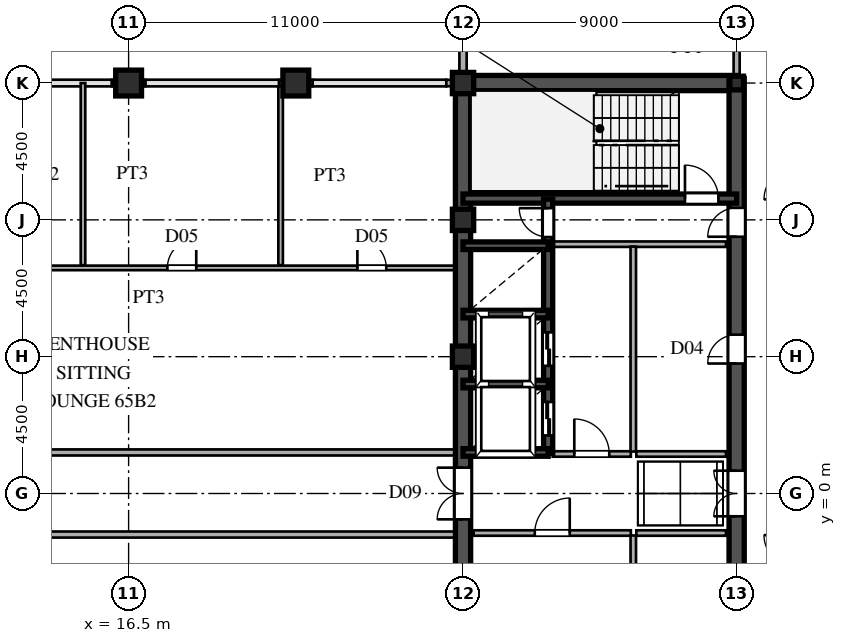
"""IFC4 building model, lengths in metres.
Left out: names, types, materials, properties, quantities, classifications, styles, units other than length and angle.
Written with IfcOpenShell. Run it as: python <this file> out.ifc"""

import sys

from ifc_helpers import new_model, si_unit, direction, frame, frame_2d, origin, origin_2d, place, context, subcontext, project, spatial, rectangle, hollow_rectangle, i_section, extrude, source, transform, mapped, element, fill, save


model = new_model("IFC4")
c1 = context("Model", 3, precision=1e-05, world=origin(), true_north=direction((0.0, 1.0)))
c2 = subcontext(c1, "Body", "Model", "MODEL_VIEW")
j1 = project(units=[si_unit("LENGTHUNIT", "METRE"), si_unit("PLANEANGLEUNIT", "RADIAN")], contexts=[c1])
p1 = place(None, origin())
s1 = spatial("IfcSite", under=j1, at=p1, CompositionType="ELEMENT")
p2 = place(p1, origin())
s2 = spatial("IfcBuilding", under=s1, at=p2, CompositionType="ELEMENT")
p3 = place(p2, frame((0.0, 0.0, 246.9)))
s3 = spatial("IfcBuildingStorey", under=s2, at=p3, CompositionType="ELEMENT", Elevation=246.9)
m1 = source(origin(), c2, "Body", "SweptSolid", [
    extrude(hollow_rectangle(XDim=0.7, YDim=0.7, WallThickness=0.03, at=origin_2d()), origin(), (0.0, 0.0, 1.0), 3.75),
])
for number, where, z_axis, x_axis in (
    (1, (27.5, 4.5, 0.0), (0.0, 0.0, 1.0), (1.0, 0.0, 0.0)),
    (2, (27.5, 9.0, 0.0), (0.0, 0.0, 1.0), (1.0, 0.0, 0.0)),
    (3, (27.5, 13.5, 0.0), (0.0, 0.0, 1.0), (1.0, 0.0, 0.0)),
):
    element("IfcColumn", number, at=place(p3, frame(where, z_axis=z_axis, x_axis=x_axis)), inside=s3, PredefinedType="COLUMN", context=c2, shape_type="MappedRepresentation", body=[
        mapped(m1, transform((0.0, 0.0, 0.0), scale=1.0)),
    ])
m2 = source(origin(), c2, "Body", "SweptSolid", [
    extrude(i_section(OverallWidth=0.45, OverallDepth=0.45, WebThickness=0.016, FlangeThickness=0.025, at=origin_2d()), origin(), (0.0, 0.0, 1.0), 3.75),
])
p4 = place(p3, frame((36.5, 13.5, 0.0), z_axis=(0.0, 0.0, 1.0), x_axis=(1.0, 0.0, 0.0)))
e4 = element("IfcColumn", 4, at=p4, inside=s3, PredefinedType="COLUMN", context=c2, shape_type="MappedRepresentation", body=[
    mapped(m2, transform((0.0, 0.0, 0.0), scale=1.0)),
])
m3 = source(origin(), c2, "Body", "SweptSolid", [
    extrude(hollow_rectangle(XDim=0.85, YDim=0.85, WallThickness=0.036, at=origin_2d()), origin(), (0.0, 0.0, 1.0), 3.75),
])
for number, where, z_axis, x_axis in (
    (5, (16.5, 13.5, 0.0), (0.0, 0.0, 1.0), (1.0, 0.0, 0.0)),
    (6, (22.0, 13.5, 0.0), (0.0, 0.0, 1.0), (1.0, 0.0, 0.0)),
):
    element("IfcColumn", number, at=place(p3, frame(where, z_axis=z_axis, x_axis=x_axis)), inside=s3, PredefinedType="COLUMN", context=c2, shape_type="MappedRepresentation", body=[
        mapped(m3, transform((0.0, 0.0, 0.0), scale=1.0)),
    ])
p5 = place(p3, frame((27.5, 13.755, 0.0), z_axis=(0.0, 0.0, 1.0), x_axis=(0.0, 1.0, 0.0)))
e7 = element("IfcWall", 7, at=p5, inside=s3, PredefinedType="SOLIDWALL", context=c2, shape_type="SweptSolid", body=[
    extrude(rectangle(XDim=0.62, YDim=0.24, at=frame_2d((0.31, 0.0))), origin(), (0.0, 0.0, 1.0), 3.03),
])
p6 = place(p3, frame((27.5, 14.375, 0.0), z_axis=(0.0, 0.0, 1.0), x_axis=(0.0, 1.0, 0.0)))
e8 = element("IfcWall", 8, at=p6, inside=s3, PredefinedType="SOLIDWALL", context=c2, shape_type="SweptSolid", body=[
    extrude(rectangle(XDim=1.605, YDim=0.24, at=frame_2d((0.803, 0.0))), origin(), (0.0, 0.0, 1.0), 3.53),
])
for number, where, z_axis, x_axis in (
    (9, (15.95, 13.5, 0.0), (0.0, 0.0, 1.0), (1.0, 0.0, 0.0)),
    (10, (21.45, 13.5, 0.0), (0.0, 0.0, 1.0), (1.0, 0.0, 0.0)),
):
    element("IfcWall", number, at=place(p3, frame(where, z_axis=z_axis, x_axis=x_axis)), inside=s3, PredefinedType="SOLIDWALL", context=c2, shape_type="SweptSolid", body=[
        extrude(rectangle(XDim=1.1, YDim=0.21, at=frame_2d((0.55, 0.0))), origin(), (0.0, 0.0, 1.0), 3.03),
    ])
p7 = place(p3, frame((26.95, 13.5, 0.0), z_axis=(0.0, 0.0, 1.0), x_axis=(1.0, 0.0, 0.0)))
e11 = element("IfcWall", 11, at=p7, inside=s3, PredefinedType="SOLIDWALL", context=c2, shape_type="SweptSolid", body=[
    extrude(rectangle(XDim=0.54, YDim=0.21, at=frame_2d((0.27, 0.0))), origin(), (0.0, 0.0, 1.0), 3.03),
])
for number, where, z_axis, x_axis in (
    (12, (27.5, -13.5, 0.0), (0.0, 0.0, 1.0), (0.0, 1.0, 0.0)),
    (13, (27.5, 1.3, 0.0), (0.0, 0.0, 1.0), (0.0, 1.0, 0.0)),
):
    element("IfcWall", number, at=place(p3, frame(where, z_axis=z_axis, x_axis=x_axis)), inside=s3, PredefinedType="SHEAR", context=c2, shape_type="SweptSolid", body=[
        extrude(rectangle(XDim=12.2, YDim=0.5, at=frame_2d((6.1, 0.0))), origin(), (0.0, 0.0, 1.0), 3.53),
    ])
p8 = place(p3, frame((27.5, -1.3, 0.0), z_axis=(0.0, 0.0, 1.0), x_axis=(0.0, 1.0, 0.0)))
e14 = element("IfcWall", 14, at=p8, inside=s3, PredefinedType="SHEAR", context=c2, shape_type="SweptSolid", body=[
    extrude(rectangle(XDim=2.6, YDim=0.5, at=frame_2d((1.3, 0.0))), origin(), (0.0, 0.0, 1.0), 3.53),
])
p9 = place(p8, frame((0.45, 0.0, 0.0)))
e15 = element("IfcOpeningElement", 15, at=p9, cuts=e14, PredefinedType="OPENING", context=c2, shape_type="SweptSolid", body=[
    extrude(rectangle(XDim=1.7, YDim=2.35, at=frame_2d((0.85, 1.175))), frame((0.0, 0.26, 0.0), z_axis=(0.0, -1.0, 0.0), x_axis=(1.0, 0.0, 0.0)), (0.0, 0.0, 1.0), 0.52),
])
p10 = place(p3, frame((27.5, 13.5, 0.0), z_axis=(0.0, 0.0, 1.0), x_axis=(1.0, 0.0, 0.0)))
e16 = element("IfcWall", 16, at=p10, inside=s3, PredefinedType="SHEAR", context=c2, shape_type="SweptSolid", body=[
    extrude(rectangle(XDim=9.0, YDim=0.5, at=frame_2d((4.5, 0.0))), origin(), (0.0, 0.0, 1.0), 3.53),
])
p11 = place(p3, frame((36.5, -1.3, 0.0), z_axis=(0.0, 0.0, 1.0), x_axis=(0.0, 1.0, 0.0)))
e17 = element("IfcWall", 17, at=p11, inside=s3, PredefinedType="SHEAR", context=c2, shape_type="SweptSolid", body=[
    extrude(rectangle(XDim=2.6, YDim=0.5, at=frame_2d((1.3, 0.0))), origin(), (0.0, 0.0, 1.0), 3.53),
])
p12 = place(p11, frame((0.55, 0.0, 0.0)))
e18 = element("IfcOpeningElement", 18, at=p12, cuts=e17, PredefinedType="OPENING", context=c2, shape_type="SweptSolid", body=[
    extrude(rectangle(XDim=1.5, YDim=2.3, at=frame_2d((0.75, 1.15))), frame((0.0, 0.26, 0.0), z_axis=(0.0, -1.0, 0.0), x_axis=(1.0, 0.0, 0.0)), (0.0, 0.0, 1.0), 0.52),
])
p13 = place(p3, frame((36.5, 8.2, 0.0), z_axis=(0.0, 0.0, 1.0), x_axis=(0.0, 1.0, 0.0)))
e19 = element("IfcWall", 19, at=p13, inside=s3, PredefinedType="SHEAR", context=c2, shape_type="SweptSolid", body=[
    extrude(rectangle(XDim=5.45, YDim=0.5, at=frame_2d((2.725, 0.0))), origin(), (0.0, 0.0, 1.0), 3.53),
])
p14 = place(p13, frame((0.245, 0.0, 0.0)))
e20 = element("IfcOpeningElement", 20, at=p14, cuts=e19, PredefinedType="OPENING", context=c2, shape_type="SweptSolid", body=[
    extrude(rectangle(XDim=0.95, YDim=2.15, at=frame_2d((0.475, 1.075))), frame((0.0, 0.26, 0.0), z_axis=(0.0, -1.0, 0.0), x_axis=(1.0, 0.0, 0.0)), (0.0, 0.0, 1.0), 0.52),
])
p15 = place(p3, frame((36.5, -6.5, 0.0), z_axis=(0.0, 0.0, 1.0), x_axis=(0.0, 1.0, 0.0)))
e21 = element("IfcWall", 21, at=p15, inside=s3, PredefinedType="SHEAR", context=c2, shape_type="SweptSolid", body=[
    extrude(rectangle(XDim=5.2, YDim=0.5, at=frame_2d((2.6, 0.0))), origin(), (0.0, 0.0, 1.0), 3.53),
])
p16 = place(p15, frame((2.125, 0.0, 0.0)))
e22 = element("IfcOpeningElement", 22, at=p16, cuts=e21, PredefinedType="OPENING", context=c2, shape_type="SweptSolid", body=[
    extrude(rectangle(XDim=0.95, YDim=2.15, at=frame_2d((0.475, 1.075))), frame((0.0, 0.26, 0.0), z_axis=(0.0, -1.0, 0.0), x_axis=(1.0, 0.0, 0.0)), (0.0, 0.0, 1.0), 0.52),
])
p17 = place(p3, frame((36.5, 1.3, 0.0), z_axis=(0.0, 0.0, 1.0), x_axis=(0.0, 1.0, 0.0)))
e23 = element("IfcWall", 23, at=p17, inside=s3, PredefinedType="SHEAR", context=c2, shape_type="SweptSolid", body=[
    extrude(rectangle(XDim=6.9, YDim=0.5, at=frame_2d((3.45, 0.0))), origin(), (0.0, 0.0, 1.0), 3.53),
])
p18 = place(p17, frame((2.975, 0.0, 0.0)))
e24 = element("IfcOpeningElement", 24, at=p18, cuts=e23, PredefinedType="OPENING", context=c2, shape_type="SweptSolid", body=[
    extrude(rectangle(XDim=0.95, YDim=2.15, at=frame_2d((0.475, 1.075))), frame((0.0, 0.26, 0.0), z_axis=(0.0, -1.0, 0.0), x_axis=(1.0, 0.0, 0.0)), (0.0, 0.0, 1.0), 0.52),
])
p19 = place(p3, frame((27.5, 9.7, 0.0), z_axis=(0.0, 0.0, 1.0), x_axis=(1.0, 0.0, 0.0)))
e25 = element("IfcWall", 25, at=p19, inside=s3, PredefinedType="SHEAR", context=c2, shape_type="SweptSolid", body=[
    extrude(rectangle(XDim=9.0, YDim=0.3, at=frame_2d((4.5, 0.0))), origin(), (0.0, 0.0, 1.0), 3.53),
])
p20 = place(p19, frame((7.3, 0.0, 0.0)))
e26 = element("IfcOpeningElement", 26, at=p20, cuts=e25, PredefinedType="OPENING", context=c2, shape_type="SweptSolid", body=[
    extrude(rectangle(XDim=1.1, YDim=2.2, at=frame_2d((0.55, 1.1))), frame((0.0, 0.16, 0.0), z_axis=(0.0, -1.0, 0.0), x_axis=(1.0, 0.0, 0.0)), (0.0, 0.0, 1.0), 0.32),
])
for number, where, z_axis, x_axis in (
    (27, (27.5, 1.35, 0.0), (0.0, 0.0, 1.0), (1.0, 0.0, 0.0)),
    (28, (27.5, 3.6, 0.0), (0.0, 0.0, 1.0), (1.0, 0.0, 0.0)),
    (29, (27.5, 5.9, 0.0), (0.0, 0.0, 1.0), (1.0, 0.0, 0.0)),
    (30, (27.5, 8.15, 0.0), (0.0, 0.0, 1.0), (1.0, 0.0, 0.0)),
):
    element("IfcWall", number, at=place(p3, frame(where, z_axis=z_axis, x_axis=x_axis)), inside=s3, PredefinedType="SHEAR", context=c2, shape_type="SweptSolid", body=[
        extrude(rectangle(XDim=2.8, YDim=0.25, at=frame_2d((1.4, 0.0))), origin(), (0.0, 0.0, 1.0), 3.53),
    ])
p21 = place(p3, frame((30.3, 1.32, 0.0), z_axis=(0.0, 0.0, 1.0), x_axis=(0.0, 1.0, 0.0)))
e31 = element("IfcWall", 31, at=p21, inside=s3, PredefinedType="SHEAR", context=c2, shape_type="SweptSolid", body=[
    extrude(rectangle(XDim=2.28, YDim=0.3, at=frame_2d((1.14, 0.0))), origin(), (0.0, 0.0, 1.0), 3.53),
])
p22 = place(p21, frame((0.59, 0.0, 0.0)))
e32 = element("IfcOpeningElement", 32, at=p22, cuts=e31, PredefinedType="OPENING", context=c2, shape_type="SweptSolid", body=[
    extrude(rectangle(XDim=1.1, YDim=2.2, at=frame_2d((0.55, 1.1))), frame((0.0, 0.16, 0.0), z_axis=(0.0, -1.0, 0.0), x_axis=(1.0, 0.0, 0.0)), (0.0, 0.0, 1.0), 0.32),
])
p23 = place(p3, frame((30.3, 3.6, 0.0), z_axis=(0.0, 0.0, 1.0), x_axis=(0.0, 1.0, 0.0)))
e33 = element("IfcWall", 33, at=p23, inside=s3, PredefinedType="SHEAR", context=c2, shape_type="SweptSolid", body=[
    extrude(rectangle(XDim=2.3, YDim=0.3, at=frame_2d((1.15, 0.0))), origin(), (0.0, 0.0, 1.0), 3.53),
])
p24 = place(p23, frame((0.6, 0.0, 0.0)))
e34 = element("IfcOpeningElement", 34, at=p24, cuts=e33, PredefinedType="OPENING", context=c2, shape_type="SweptSolid", body=[
    extrude(rectangle(XDim=1.1, YDim=2.2, at=frame_2d((0.55, 1.1))), frame((0.0, 0.16, 0.0), z_axis=(0.0, -1.0, 0.0), x_axis=(1.0, 0.0, 0.0)), (0.0, 0.0, 1.0), 0.32),
])
p25 = place(p3, frame((30.3, 5.9, 0.0), z_axis=(0.0, 0.0, 1.0), x_axis=(0.0, 1.0, 0.0)))
e35 = element("IfcWall", 35, at=p25, inside=s3, PredefinedType="SHEAR", context=c2, shape_type="SweptSolid", body=[
    extrude(rectangle(XDim=2.25, YDim=0.3, at=frame_2d((1.125, 0.0))), origin(), (0.0, 0.0, 1.0), 3.53),
])
p26 = place(p3, frame((30.3, 8.15, 0.0), z_axis=(0.0, 0.0, 1.0), x_axis=(0.0, 1.0, 0.0)))
e36 = element("IfcWall", 36, at=p26, inside=s3, PredefinedType="SHEAR", context=c2, shape_type="SweptSolid", body=[
    extrude(rectangle(XDim=1.53, YDim=0.3, at=frame_2d((0.765, 0.0))), origin(), (0.0, 0.0, 1.0), 3.53),
])
p27 = place(p26, frame((0.285, 0.0, 0.0)))
e37 = element("IfcOpeningElement", 37, at=p27, cuts=e36, PredefinedType="OPENING", context=c2, shape_type="SweptSolid", body=[
    extrude(rectangle(XDim=0.95, YDim=2.15, at=frame_2d((0.475, 1.075))), frame((0.0, 0.16, 0.0), z_axis=(0.0, -1.0, 0.0), x_axis=(1.0, 0.0, 0.0)), (0.0, 0.0, 1.0), 0.32),
])
p28 = place(p3, frame((30.45, 8.2, 0.0), z_axis=(0.0, 0.0, 1.0), x_axis=(1.0, 0.0, 0.0)))
e38 = element("IfcWall", 38, at=p28, inside=s3, PredefinedType="PARTITIONING", context=c2, shape_type="SweptSolid", body=[
    extrude(rectangle(XDim=5.7, YDim=0.18, at=frame_2d((2.85, 0.0))), origin(), (0.0, 0.0, 1.0), 3.53),
])
p29 = place(p3, frame((33.1, -6.42, 0.0), z_axis=(0.0, 0.0, 1.0), x_axis=(0.0, 1.0, 0.0)))
e39 = element("IfcWall", 39, at=p29, inside=s3, PredefinedType="PARTITIONING", context=c2, shape_type="SweptSolid", body=[
    extrude(rectangle(XDim=5.04, YDim=0.18, at=frame_2d((2.52, 0.0))), origin(), (0.0, 0.0, 1.0), 3.53),
])
p30 = place(p3, frame((33.1, 1.38, 0.0), z_axis=(0.0, 0.0, 1.0), x_axis=(0.0, 1.0, 0.0)))
e40 = element("IfcWall", 40, at=p30, inside=s3, PredefinedType="PARTITIONING", context=c2, shape_type="SweptSolid", body=[
    extrude(rectangle(XDim=6.74, YDim=0.18, at=frame_2d((3.37, 0.0))), origin(), (0.0, 0.0, 1.0), 3.53),
])
p31 = place(p3, frame((27.85, -1.3, 0.0), z_axis=(0.0, 0.0, 1.0), x_axis=(1.0, 0.0, 0.0)))
e41 = element("IfcWall", 41, at=p31, inside=s3, PredefinedType="PARTITIONING", context=c2, shape_type="SweptSolid", body=[
    extrude(rectangle(XDim=5.17, YDim=0.18, at=frame_2d((2.585, 0.0))), origin(), (0.0, 0.0, 1.0), 3.53),
])
p32 = place(p31, frame((2.01, 0.0, 0.0)))
e42 = element("IfcOpeningElement", 42, at=p32, cuts=e41, PredefinedType="OPENING", context=c2, shape_type="SweptSolid", body=[
    extrude(rectangle(XDim=1.15, YDim=2.2, at=frame_2d((0.575, 1.1))), frame((0.0, 0.1, 0.0), z_axis=(0.0, -1.0, 0.0), x_axis=(1.0, 0.0, 0.0)), (0.0, 0.0, 1.0), 0.2),
])
p33 = place(p3, frame((30.45, 1.3, 0.0), z_axis=(0.0, 0.0, 1.0), x_axis=(1.0, 0.0, 0.0)))
e43 = element("IfcWall", 43, at=p33, inside=s3, PredefinedType="PARTITIONING", context=c2, shape_type="SweptSolid", body=[
    extrude(rectangle(XDim=2.57, YDim=0.18, at=frame_2d((1.285, 0.0))), origin(), (0.0, 0.0, 1.0), 3.53),
])
p34 = place(p33, frame((0.71, 0.0, 0.0)))
e44 = element("IfcOpeningElement", 44, at=p34, cuts=e43, PredefinedType="OPENING", context=c2, shape_type="SweptSolid", body=[
    extrude(rectangle(XDim=1.15, YDim=2.2, at=frame_2d((0.575, 1.1))), frame((0.0, 0.1, 0.0), z_axis=(0.0, -1.0, 0.0), x_axis=(1.0, 0.0, 0.0)), (0.0, 0.0, 1.0), 0.2),
])
for number, where, z_axis, x_axis in (
    (45, (33.2, -1.3, 0.0), (0.0, 0.0, 1.0), (1.0, 0.0, 0.0)),
    (46, (33.2, 1.3, 0.0), (0.0, 0.0, 1.0), (1.0, 0.0, 0.0)),
):
    element("IfcWall", number, at=place(p3, frame(where, z_axis=z_axis, x_axis=x_axis)), inside=s3, PredefinedType="PARTITIONING", context=c2, shape_type="SweptSolid", body=[
        extrude(rectangle(XDim=2.95, YDim=0.18, at=frame_2d((1.475, 0.0))), origin(), (0.0, 0.0, 1.0), 3.53),
    ])
p35 = place(p3, frame((-27.245, -1.35, 0.0), z_axis=(0.0, 0.0, 1.0), x_axis=(1.0, 0.0, 0.0)))
e47 = element("IfcWall", 47, at=p35, inside=s3, PredefinedType="PARTITIONING", context=c2, shape_type="SweptSolid", body=[
    extrude(rectangle(XDim=54.49, YDim=0.2, at=frame_2d((27.245, 0.0))), origin(), (0.0, 0.0, 1.0), 3.53),
])
p36 = place(p35, frame((24.97, 0.0, 0.0)))
e48 = element("IfcOpeningElement", 48, at=p36, cuts=e47, PredefinedType="OPENING", context=c2, shape_type="SweptSolid", body=[
    extrude(rectangle(XDim=1.05, YDim=2.25, at=frame_2d((0.525, 1.125))), frame((0.0, 0.11, 0.0), z_axis=(0.0, -1.0, 0.0), x_axis=(1.0, 0.0, 0.0)), (0.0, 0.0, 1.0), 0.22),
])
p37 = place(p3, frame((-27.245, 1.35, 0.0), z_axis=(0.0, 0.0, 1.0), x_axis=(1.0, 0.0, 0.0)))
e49 = element("IfcWall", 49, at=p37, inside=s3, PredefinedType="PARTITIONING", context=c2, shape_type="SweptSolid", body=[
    extrude(rectangle(XDim=54.49, YDim=0.2, at=frame_2d((27.245, 0.0))), origin(), (0.0, 0.0, 1.0), 3.53),
])
p38 = place(p37, frame((24.97, 0.0, 0.0)))
e50 = element("IfcOpeningElement", 50, at=p38, cuts=e49, PredefinedType="OPENING", context=c2, shape_type="SweptSolid", body=[
    extrude(rectangle(XDim=1.05, YDim=2.25, at=frame_2d((0.525, 1.125))), frame((0.0, 0.11, 0.0), z_axis=(0.0, -1.0, 0.0), x_axis=(1.0, 0.0, 0.0)), (0.0, 0.0, 1.0), 0.22),
])
p39 = place(p3, frame((7.085, 7.42, 0.0), z_axis=(0.0, 0.0, 1.0), x_axis=(1.0, 0.0, 0.0)))
e51 = element("IfcWall", 51, at=p39, inside=s3, PredefinedType="PARTITIONING", context=c2, shape_type="SweptSolid", body=[
    extrude(rectangle(XDim=20.16, YDim=0.15, at=frame_2d((10.08, 0.0))), origin(), (0.0, 0.0, 1.0), 3.53),
])
p40 = place(p39, frame((3.44, 0.0, 0.0)))
e52 = element("IfcOpeningElement", 52, at=p40, cuts=e51, PredefinedType="OPENING", context=c2, shape_type="SweptSolid", body=[
    extrude(rectangle(XDim=0.95, YDim=2.15, at=frame_2d((0.475, 1.075))), frame((0.0, 0.085, 0.0), z_axis=(0.0, -1.0, 0.0), x_axis=(1.0, 0.0, 0.0)), (0.0, 0.0, 1.0), 0.17),
])
p41 = place(p39, frame((10.69, 0.0, 0.0)))
e53 = element("IfcOpeningElement", 53, at=p41, cuts=e51, PredefinedType="OPENING", context=c2, shape_type="SweptSolid", body=[
    extrude(rectangle(XDim=0.95, YDim=2.15, at=frame_2d((0.475, 1.075))), frame((0.0, 0.085, 0.0), z_axis=(0.0, -1.0, 0.0), x_axis=(1.0, 0.0, 0.0)), (0.0, 0.0, 1.0), 0.17),
])
p42 = place(p39, frame((16.94, 0.0, 0.0)))
e54 = element("IfcOpeningElement", 54, at=p42, cuts=e51, PredefinedType="OPENING", context=c2, shape_type="SweptSolid", body=[
    extrude(rectangle(XDim=0.95, YDim=2.15, at=frame_2d((0.475, 1.075))), frame((0.0, 0.085, 0.0), z_axis=(0.0, -1.0, 0.0), x_axis=(1.0, 0.0, 0.0)), (0.0, 0.0, 1.0), 0.17),
])
p43 = place(p3, frame((15.0, 7.51, 0.0), z_axis=(0.0, 0.0, 1.0), x_axis=(0.0, 1.0, 0.0)))
e55 = element("IfcWall", 55, at=p43, inside=s3, PredefinedType="PARTITIONING", context=c2, shape_type="SweptSolid", body=[
    extrude(rectangle(XDim=5.99, YDim=0.15, at=frame_2d((2.995, 0.0))), origin(), (0.0, 0.0, 1.0), 3.53),
])
p44 = place(p3, frame((21.5, 7.51, 0.0), z_axis=(0.0, 0.0, 1.0), x_axis=(0.0, 1.0, 0.0)))
e56 = element("IfcWall", 56, at=p44, inside=s3, PredefinedType="PARTITIONING", context=c2, shape_type="SweptSolid", body=[
    extrude(rectangle(XDim=5.88, YDim=0.15, at=frame_2d((2.94, 0.0))), origin(), (0.0, 0.0, 1.0), 3.53),
])
p45 = place(p3, frame((36.5, 13.755, 0.0), z_axis=(0.0, 0.0, 1.0), x_axis=(0.0, 1.0, 0.0)))
e57 = element("IfcWall", 57, at=p45, inside=s3, PredefinedType="PARTITIONING", context=c2, shape_type="SweptSolid", body=[
    extrude(rectangle(XDim=1.76, YDim=0.2, at=frame_2d((0.88, 0.0))), origin(), (0.0, 0.0, 1.0), 2.93),
])
m4 = source(origin(), c2, "Body", "SweptSolid", [
    extrude(rectangle(XDim=1.7, YDim=2.35, at=frame_2d((0.85, 1.175))), frame((0.0, 0.025, 0.0), z_axis=(0.0, -1.0, 0.0), x_axis=(1.0, 0.0, 0.0)), (0.0, 0.0, 1.0), 0.05),
])
p46 = place(p9, origin())
e58 = element("IfcDoor", 58, at=p46, inside=s3, OperationType="DOUBLE_SWING_LEFT", PredefinedType="DOOR", context=c2, shape_type="MappedRepresentation", body=[
    mapped(m4, transform((0.0, 0.0, 0.0), scale=1.0)),
])
fill(e15, e58)
m5 = source(origin(), c2, "Body", "SweptSolid", [
    extrude(rectangle(XDim=1.5, YDim=2.3, at=frame_2d((0.75, 1.15))), frame((0.0, 0.025, 0.0), z_axis=(0.0, -1.0, 0.0), x_axis=(1.0, 0.0, 0.0)), (0.0, 0.0, 1.0), 0.05),
])
p47 = place(p12, origin())
e59 = element("IfcDoor", 59, at=p47, inside=s3, OperationType="DOUBLE_SWING_LEFT", PredefinedType="DOOR", context=c2, shape_type="MappedRepresentation", body=[
    mapped(m5, transform((0.0, 0.0, 0.0), scale=1.0)),
])
fill(e18, e59)
m6 = source(origin(), c2, "Body", "SweptSolid", [
    extrude(rectangle(XDim=0.95, YDim=2.15, at=frame_2d((0.475, 1.075))), frame((0.0, 0.025, 0.0), z_axis=(0.0, -1.0, 0.0), x_axis=(1.0, 0.0, 0.0)), (0.0, 0.0, 1.0), 0.05),
])
p48 = place(p14, origin())
e60 = element("IfcDoor", 60, at=p48, inside=s3, OperationType="SINGLE_SWING_LEFT", PredefinedType="DOOR", context=c2, shape_type="MappedRepresentation", body=[
    mapped(m6, transform((0.0, 0.0, 0.0), scale=1.0)),
])
fill(e20, e60)
p49 = place(p18, origin())
e61 = element("IfcDoor", 61, at=p49, inside=s3, OperationType="SINGLE_SWING_LEFT", PredefinedType="DOOR", context=c2, shape_type="MappedRepresentation", body=[
    mapped(m6, transform((0.0, 0.0, 0.0), scale=1.0)),
])
fill(e24, e61)
m7 = source(origin(), c2, "Body", "SweptSolid", [
    extrude(rectangle(XDim=1.1, YDim=2.2, at=frame_2d((0.55, 1.1))), frame((0.0, 0.025, 0.0), z_axis=(0.0, -1.0, 0.0), x_axis=(1.0, 0.0, 0.0)), (0.0, 0.0, 1.0), 0.05),
])
p50 = place(p20, origin())
e62 = element("IfcDoor", 62, at=p50, inside=s3, OperationType="SINGLE_SWING_LEFT", PredefinedType="DOOR", context=c2, shape_type="MappedRepresentation", body=[
    mapped(m7, transform((0.0, 0.0, 0.0), scale=1.0)),
])
fill(e26, e62)
m8 = source(origin(), c2, "Body", "SweptSolid", [
    extrude(rectangle(XDim=1.1, YDim=2.2, at=frame_2d((0.55, 1.1))), frame((0.0, 0.025, 0.0), z_axis=(0.0, -1.0, 0.0), x_axis=(1.0, 0.0, 0.0)), (0.0, 0.0, 1.0), 0.05),
])
p51 = place(p22, origin())
e63 = element("IfcDoor", 63, at=p51, inside=s3, OperationType="DOUBLE_DOOR_SLIDING", PredefinedType="DOOR", context=c2, shape_type="MappedRepresentation", body=[
    mapped(m8, transform((0.0, 0.0, 0.0), scale=1.0)),
])
fill(e32, e63)
p52 = place(p24, origin())
e64 = element("IfcDoor", 64, at=p52, inside=s3, OperationType="DOUBLE_DOOR_SLIDING", PredefinedType="DOOR", context=c2, shape_type="MappedRepresentation", body=[
    mapped(m8, transform((0.0, 0.0, 0.0), scale=1.0)),
])
fill(e34, e64)
p53 = place(p27, origin())
e65 = element("IfcDoor", 65, at=p53, inside=s3, OperationType="SINGLE_SWING_RIGHT", PredefinedType="DOOR", context=c2, shape_type="MappedRepresentation", body=[
    mapped(m6, transform((0.0, 0.0, 0.0), scale=1.0)),
])
fill(e37, e65)
m9 = source(origin(), c2, "Body", "SweptSolid", [
    extrude(rectangle(XDim=1.15, YDim=2.2, at=frame_2d((0.575, 1.1))), frame((0.0, 0.025, 0.0), z_axis=(0.0, -1.0, 0.0), x_axis=(1.0, 0.0, 0.0)), (0.0, 0.0, 1.0), 0.05),
])
p54 = place(p32, origin())
e66 = element("IfcDoor", 66, at=p54, inside=s3, OperationType="SINGLE_SWING_RIGHT", PredefinedType="DOOR", context=c2, shape_type="MappedRepresentation", body=[
    mapped(m9, transform((0.0, 0.0, 0.0), scale=1.0)),
])
fill(e42, e66)
p55 = place(p34, origin())
e67 = element("IfcDoor", 67, at=p55, inside=s3, OperationType="SINGLE_SWING_LEFT", PredefinedType="DOOR", context=c2, shape_type="MappedRepresentation", body=[
    mapped(m9, transform((0.0, 0.0, 0.0), scale=1.0)),
])
fill(e44, e67)
m10 = source(origin(), c2, "Body", "SweptSolid", [
    extrude(rectangle(XDim=0.95, YDim=2.15, at=frame_2d((0.475, 1.075))), frame((0.0, 0.025, 0.0), z_axis=(0.0, -1.0, 0.0), x_axis=(1.0, 0.0, 0.0)), (0.0, 0.0, 1.0), 0.05),
])
p56 = place(p41, origin())
e68 = element("IfcDoor", 68, at=p56, inside=s3, OperationType="SINGLE_SWING_RIGHT", PredefinedType="DOOR", context=c2, shape_type="MappedRepresentation", body=[
    mapped(m10, transform((0.0, 0.0, 0.0), scale=1.0)),
])
fill(e53, e68)
p57 = place(p42, origin())
e69 = element("IfcDoor", 69, at=p57, inside=s3, OperationType="SINGLE_SWING_LEFT", PredefinedType="DOOR", context=c2, shape_type="MappedRepresentation", body=[
    mapped(m10, transform((0.0, 0.0, 0.0), scale=1.0)),
])
fill(e54, e69)
save(model, sys.argv[1])
